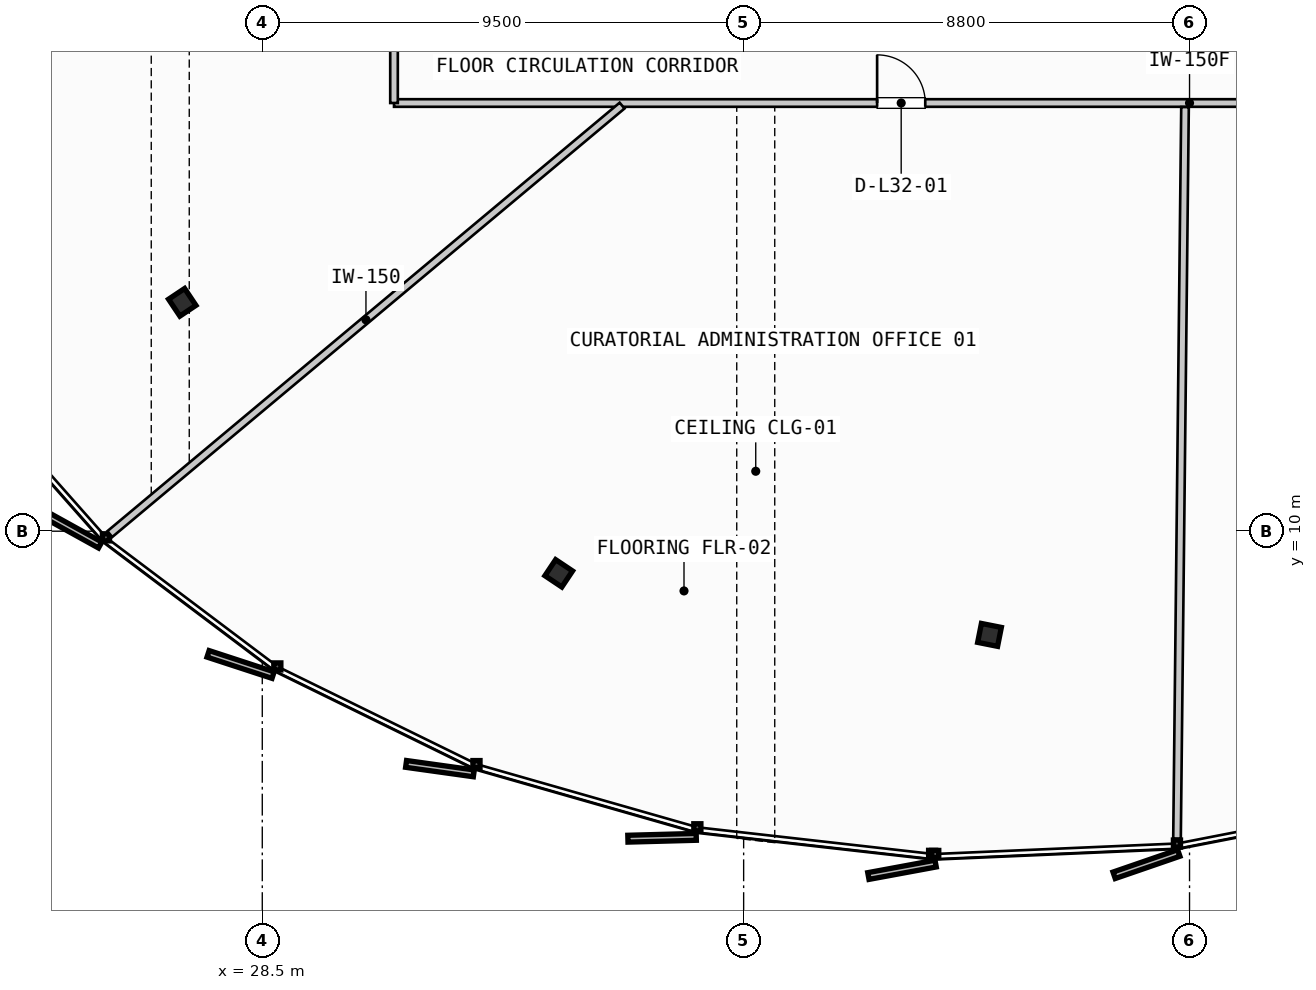
"""IFC4 building model, lengths in metres.
Left out: names, types, materials, properties, quantities, classifications, styles, units other than length and angle.
Written with IfcOpenShell. Run it as: python <this file> out.ifc"""

import sys

from ifc_helpers import new_model, si_unit, direction, frame, frame_2d, origin, origin_2d, place, context, subcontext, project, spatial, rectangle, i_section, extrude, source, transform, mapped, element, fill, save


model = new_model("IFC4")
c1 = context("Model", 3, precision=1e-05, world=origin(), true_north=direction((0.0, 1.0)))
c2 = subcontext(c1, "Body", "Model", "MODEL_VIEW")
j1 = project(units=[si_unit("LENGTHUNIT", "METRE"), si_unit("PLANEANGLEUNIT", "RADIAN")], contexts=[c1])
p1 = place(None, origin())
s1 = spatial("IfcSite", under=j1, at=p1, CompositionType="ELEMENT")
p2 = place(p1, origin())
s2 = spatial("IfcBuilding", under=s1, at=p2, CompositionType="ELEMENT")
p3 = place(p2, frame((0.0, 0.0, 128.8)))
s3 = spatial("IfcBuildingStorey", under=s2, at=p3, CompositionType="ELEMENT", Elevation=128.8)
m1 = source(origin(), c2, "Body", "SweptSolid", [
    extrude(i_section(OverallWidth=0.401, OverallDepth=0.381, WebThickness=0.032, FlangeThickness=0.051, FilletRadius=0.015, at=origin_2d()), origin(), (0.0, 0.0, 1.0), 3.3),
])
for number, where, z_axis, x_axis in (
    (1, (26.921, 14.517, 0.0), (0.0, 0.0, 1.0), (-0.831, -0.556, 0.0)),
    (2, (34.351, 9.168, 0.0), (0.0, 0.0, 1.0), (-0.556, -0.831, 0.0)),
    (3, (42.852, 7.954, 0.0), (0.0, 0.0, 1.0), (-0.195, -0.981, 0.0)),
):
    element("IfcColumn", number, at=place(p3, frame(where, z_axis=z_axis, x_axis=x_axis)), inside=s3, PredefinedType="COLUMN", context=c2, shape_type="MappedRepresentation", body=[
        mapped(m1, transform((0.0, 0.0, 0.0), scale=1.0)),
    ])
p4 = place(p3, frame((31.1, 18.45, 0.0), z_axis=(0.0, 0.0, 1.0), x_axis=(1.0, 0.0, 0.0)))
e4 = element("IfcWall", 4, at=p4, inside=s3, PredefinedType="PARTITIONING", context=c2, shape_type="SweptSolid", body=[
    extrude(rectangle(XDim=31.4, YDim=0.15, at=frame_2d((15.7, 0.0))), origin(), (0.0, 0.0, 1.0), 2.445),
])
p5 = place(p4, frame((9.534, 0.0, 0.0)))
e5 = element("IfcOpeningElement", 5, at=p5, cuts=e4, PredefinedType="OPENING", context=c2, shape_type="SweptSolid", body=[
    extrude(rectangle(XDim=0.95, YDim=2.15, at=frame_2d((0.475, 1.075))), frame((0.0, 0.085, 0.0), z_axis=(0.0, -1.0, 0.0), x_axis=(1.0, 0.0, 0.0)), (0.0, 0.0, 1.0), 0.17),
])
p6 = place(p4, frame((20.343, 0.0, 0.0)))
e6 = element("IfcOpeningElement", 6, at=p6, cuts=e4, PredefinedType="OPENING", context=c2, shape_type="SweptSolid", body=[
    extrude(rectangle(XDim=0.95, YDim=2.15, at=frame_2d((0.475, 1.075))), frame((0.0, 0.085, 0.0), z_axis=(0.0, -1.0, 0.0), x_axis=(1.0, 0.0, 0.0)), (0.0, 0.0, 1.0), 0.17),
])
p7 = place(p3, frame((31.1, 20.15, 0.0), z_axis=(0.0, 0.0, 1.0), x_axis=(0.0, -1.0, 0.0)))
e7 = element("IfcWall", 7, at=p7, inside=s3, PredefinedType="PARTITIONING", context=c2, shape_type="SweptSolid", body=[
    extrude(rectangle(XDim=1.7, YDim=0.15, at=frame_2d((0.85, 0.0))), origin(), (0.0, 0.0, 1.0), 2.445),
])
p8 = place(p3, frame((35.601, 18.399, 0.0), z_axis=(0.0, 0.0, 1.0), x_axis=(-0.767084328757, -0.641546282489, 0.0)))
e8 = element("IfcWall", 8, at=p8, inside=s3, PredefinedType="PARTITIONING", context=c2, shape_type="SweptSolid", body=[
    extrude(rectangle(XDim=13.18, YDim=0.15, at=frame_2d((6.59, 0.0))), origin(), (0.0, 0.0, 1.0), 2.445),
])
p9 = place(p3, frame((46.711, 18.37, 0.0), z_axis=(0.0, 0.0, 1.0), x_axis=(-0.010942632521, -0.999940127604, 0.0)))
e9 = element("IfcWall", 9, at=p9, inside=s3, PredefinedType="PARTITIONING", context=c2, shape_type="SweptSolid", body=[
    extrude(rectangle(XDim=14.435, YDim=0.15, at=frame_2d((7.218, 0.0))), origin(), (0.0, 0.0, 1.0), 2.445),
])
m2 = source(origin(), c2, "Body", "SweptSolid", [
    extrude(rectangle(XDim=0.95, YDim=2.15, at=frame_2d((0.475, 1.075))), frame((0.0, 0.025, 0.0), z_axis=(0.0, -1.0, 0.0), x_axis=(1.0, 0.0, 0.0)), (0.0, 0.0, 1.0), 0.05),
])
p10 = place(p5, origin())
e10 = element("IfcDoor", 10, at=p10, inside=s3, OperationType="SINGLE_SWING_LEFT", PredefinedType="DOOR", context=c2, shape_type="MappedRepresentation", body=[
    mapped(m2, transform((0.0, 0.0, 0.0), scale=1.0)),
])
fill(e5, e10)
save(model, sys.argv[1])
